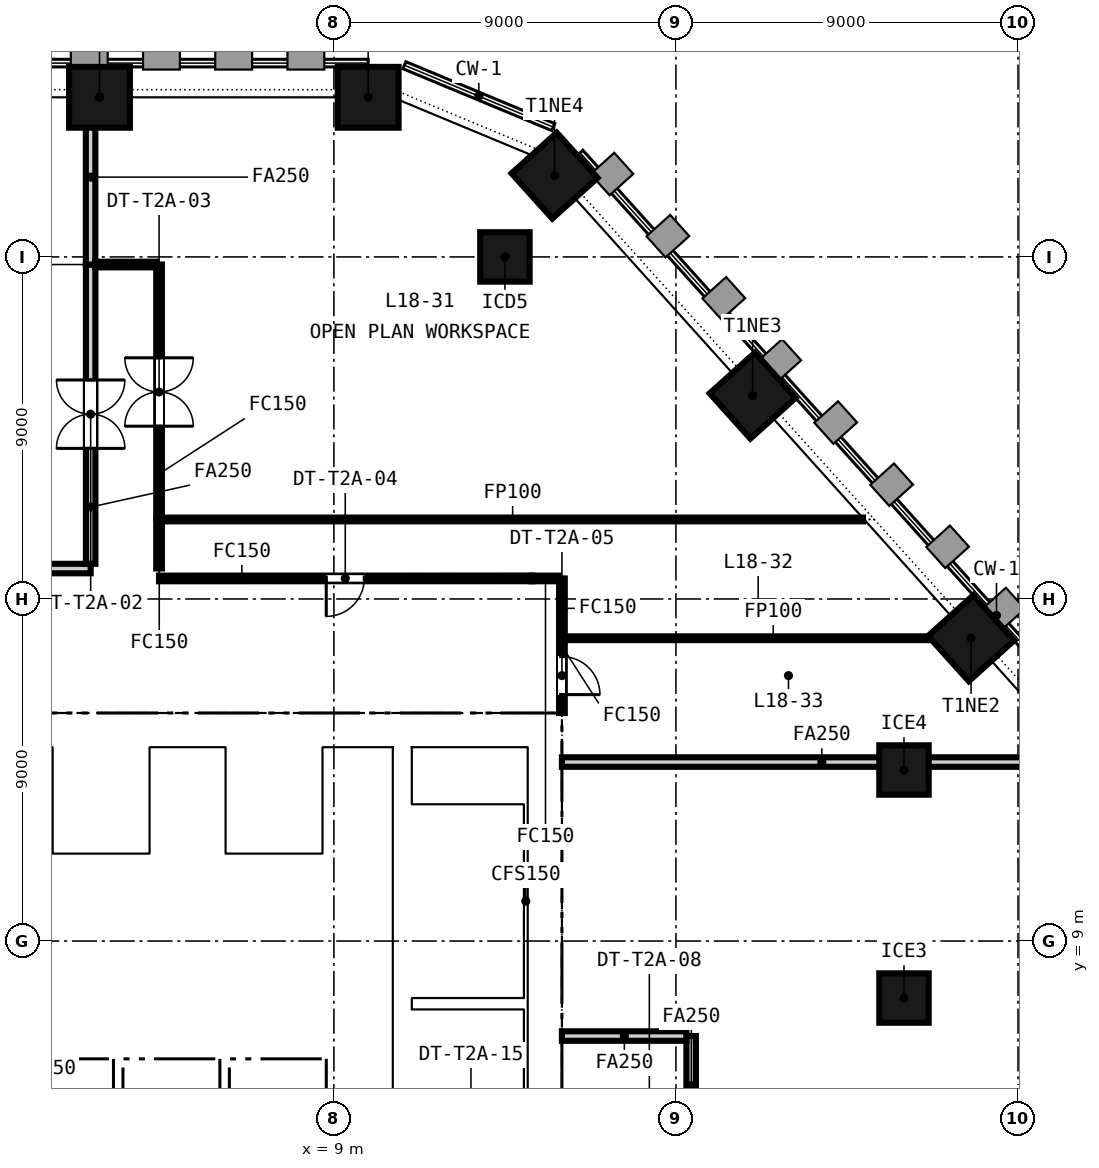
"""IFC4 building model, lengths in metres.
Left out: names, types, materials, properties, quantities, classifications, styles, units other than length and angle.
Written with IfcOpenShell. Run it as: python <this file> out.ifc"""

import sys

from ifc_helpers import new_model, si_unit, direction, frame, frame_2d, origin, origin_2d, place, context, subcontext, project, spatial, rectangle, extrude, element, fill, save


model = new_model("IFC4")
c1 = context("Model", 3, precision=1e-05, world=origin(), true_north=direction((0.0, 1.0)))
c2 = subcontext(c1, "Body", "Model", "MODEL_VIEW")
j1 = project(units=[si_unit("LENGTHUNIT", "METRE"), si_unit("PLANEANGLEUNIT", "RADIAN")], contexts=[c1])
p1 = place(None, origin())
s1 = spatial("IfcSite", under=j1, at=p1, CompositionType="ELEMENT")
p2 = place(p1, origin())
s2 = spatial("IfcBuilding", under=s1, at=p2, CompositionType="ELEMENT")
p3 = place(p2, frame((0.0, 0.0, 80.65)))
s3 = spatial("IfcBuildingStorey", under=s2, at=p3, CompositionType="ELEMENT", Elevation=80.65)
p4 = place(p3, frame((-15.0, 14.55, -0.15), z_axis=(0.0, 0.0, 1.0), x_axis=(1.0, 0.0, 0.0)))
e1 = element("IfcWall", 1, at=p4, inside=s3, PredefinedType="SOLIDWALL", context=c2, shape_type="SweptSolid", body=[
    extrude(rectangle(XDim=30.0, YDim=0.9, at=frame_2d((15.0, 0.0))), origin(), (0.0, 0.0, 1.0), 3.65),
])
p5 = place(p4, frame((9.25, 0.0, 0.15)))
e2 = element("IfcOpeningElement", 2, at=p5, cuts=e1, PredefinedType="OPENING", context=c2, shape_type="SweptSolid", body=[
    extrude(rectangle(XDim=1.5, YDim=2.1, at=frame_2d((0.75, 1.05))), frame((0.0, 0.46, 0.0), z_axis=(0.0, -1.0, 0.0), x_axis=(1.0, 0.0, 0.0)), (0.0, 0.0, 1.0), 0.92),
])
p6 = place(p4, frame((19.4, 0.0, 0.15)))
e3 = element("IfcOpeningElement", 3, at=p6, cuts=e1, PredefinedType="OPENING", context=c2, shape_type="SweptSolid", body=[
    extrude(rectangle(XDim=1.5, YDim=2.1, at=frame_2d((0.75, 1.05))), frame((0.0, 0.46, 0.0), z_axis=(0.0, -1.0, 0.0), x_axis=(1.0, 0.0, 0.0)), (0.0, 0.0, 1.0), 0.92),
])
p7 = place(p4, frame((1.5, 0.0, 0.15)))
e4 = element("IfcOpeningElement", 4, at=p7, cuts=e1, PredefinedType="OPENING", context=c2, shape_type="SweptSolid", body=[
    extrude(rectangle(XDim=1.2, YDim=2.1, at=frame_2d((0.6, 1.05))), frame((0.0, 0.46, 0.0), z_axis=(0.0, -1.0, 0.0), x_axis=(1.0, 0.0, 0.0)), (0.0, 0.0, 1.0), 0.92),
])
p8 = place(p4, frame((27.3, 0.0, 0.15)))
e5 = element("IfcOpeningElement", 5, at=p8, cuts=e1, PredefinedType="OPENING", context=c2, shape_type="SweptSolid", body=[
    extrude(rectangle(XDim=1.2, YDim=2.1, at=frame_2d((0.6, 1.05))), frame((0.0, 0.46, 0.0), z_axis=(0.0, -1.0, 0.0), x_axis=(1.0, 0.0, 0.0)), (0.0, 0.0, 1.0), 0.92),
])
p9 = place(p3, frame((14.55, 0.9, -0.15), z_axis=(0.0, 0.0, 1.0), x_axis=(0.0, 1.0, 0.0)))
e6 = element("IfcWall", 6, at=p9, inside=s3, PredefinedType="SOLIDWALL", context=c2, shape_type="SweptSolid", body=[
    extrude(rectangle(XDim=13.2, YDim=0.9, at=frame_2d((6.6, 0.0))), origin(), (0.0, 0.0, 1.0), 3.65),
])
p10 = place(p3, frame((10.8, 0.9, -0.15), z_axis=(0.0, 0.0, 1.0), x_axis=(0.0, 1.0, 0.0)))
e7 = element("IfcWall", 7, at=p10, inside=s3, PredefinedType="SOLIDWALL", context=c2, shape_type="SweptSolid", body=[
    extrude(rectangle(XDim=13.2, YDim=0.5, at=frame_2d((6.6, 0.0))), origin(), (0.0, 0.0, 1.0), 3.65),
])
for number, where, z_axis, x_axis in (
    (8, (9.902, 31.2, -0.15), (0.0, 0.0, 1.0), (-1.0, 0.0, 0.0)),
    (9, (2.832, 31.2, -0.15), (0.0, 0.0, 1.0), (-1.0, 0.0, 0.0)),
    (10, (25.765, 16.967, -0.15), (0.0, 0.0, 1.0), (-0.669, 0.743, 0.0)),
    (11, (20.018, 23.35, -0.15), (0.0, 0.0, 1.0), (-0.669, 0.743, 0.0)),
    (12, (14.806, 29.139, -0.15), (0.0, 0.0, 1.0), (-0.669, 0.743, 0.0)),
):
    element("IfcColumn", number, at=place(p3, frame(where, z_axis=z_axis, x_axis=x_axis)), inside=s3, PredefinedType="COLUMN", context=c2, shape_type="SweptSolid", body=[
        extrude(rectangle(XDim=1.6, YDim=1.6, at=origin_2d()), origin(), (0.0, 0.0, 1.0), 3.65),
    ])
for number, where, z_axis, x_axis in (
    (13, (13.5, 27.0, -0.15), (0.0, 0.0, 1.0), (1.0, 0.0, 0.0)),
    (14, (24.0, 7.5, -0.15), (0.0, 0.0, 1.0), (1.0, 0.0, 0.0)),
    (15, (24.0, 13.5, -0.15), (0.0, 0.0, 1.0), (1.0, 0.0, 0.0)),
):
    element("IfcColumn", number, at=place(p3, frame(where, z_axis=z_axis, x_axis=x_axis)), inside=s3, PredefinedType="COLUMN", context=c2, shape_type="SweptSolid", body=[
        extrude(rectangle(XDim=1.3, YDim=1.3, at=origin_2d()), origin(), (0.0, 0.0, 1.0), 3.65),
    ])
p11 = place(p3, frame((-10.55, 6.025, 0.0), z_axis=(0.0, 0.0, 1.0), x_axis=(1.0, 0.0, 0.0)))
e16 = element("IfcWall", 16, at=p11, inside=s3, PredefinedType="PARTITIONING", context=c2, shape_type="SweptSolid", body=[
    extrude(rectangle(XDim=21.1, YDim=0.25, at=frame_2d((10.55, 0.0))), origin(), (0.0, 0.0, 1.0), 3.5),
])
p12 = place(p3, frame((-4.125, 8.55, 0.0), z_axis=(0.0, 0.0, 1.0), x_axis=(1.0, 0.0, 0.0)))
e17 = element("IfcWall", 17, at=p12, inside=s3, PredefinedType="PARTITIONING", context=c2, shape_type="SweptSolid", body=[
    extrude(rectangle(XDim=14.675, YDim=0.2, at=frame_2d((7.337, 0.0))), origin(), (0.0, 0.0, 1.0), 3.5),
])
p13 = place(p12, frame((1.413, 0.0, 0.0)))
e18 = element("IfcOpeningElement", 18, at=p13, cuts=e17, PredefinedType="OPENING", context=c2, shape_type="SweptSolid", body=[
    extrude(rectangle(XDim=1.0, YDim=2.1, at=frame_2d((0.5, 1.05))), frame((0.0, 0.11, 0.0), z_axis=(0.0, -1.0, 0.0), x_axis=(1.0, 0.0, 0.0)), (0.0, 0.0, 1.0), 0.22),
])
p14 = place(p12, frame((5.0, 0.0, 0.0)))
e19 = element("IfcOpeningElement", 19, at=p14, cuts=e17, PredefinedType="OPENING", context=c2, shape_type="SweptSolid", body=[
    extrude(rectangle(XDim=1.0, YDim=2.1, at=frame_2d((0.5, 1.05))), frame((0.0, 0.11, 0.0), z_axis=(0.0, -1.0, 0.0), x_axis=(1.0, 0.0, 0.0)), (0.0, 0.0, 1.0), 0.22),
])
p15 = place(p12, frame((9.613, 0.0, 0.0)))
e20 = element("IfcOpeningElement", 20, at=p15, cuts=e17, PredefinedType="OPENING", context=c2, shape_type="SweptSolid", body=[
    extrude(rectangle(XDim=1.0, YDim=2.1, at=frame_2d((0.5, 1.05))), frame((0.0, 0.11, 0.0), z_axis=(0.0, -1.0, 0.0), x_axis=(1.0, 0.0, 0.0)), (0.0, 0.0, 1.0), 0.22),
])
p16 = place(p12, frame((13.475, 0.0, 0.0)))
e21 = element("IfcOpeningElement", 21, at=p16, cuts=e17, PredefinedType="OPENING", context=c2, shape_type="SweptSolid", body=[
    extrude(rectangle(XDim=0.9, YDim=2.1, at=frame_2d((0.45, 1.05))), frame((0.0, 0.11, 0.0), z_axis=(0.0, -1.0, 0.0), x_axis=(1.0, 0.0, 0.0)), (0.0, 0.0, 1.0), 0.22),
])
p17 = place(p3, frame((-4.25, 11.2, 0.0), z_axis=(0.0, 0.0, 1.0), x_axis=(1.0, 0.0, 0.0)))
e22 = element("IfcWall", 22, at=p17, inside=s3, PredefinedType="PARTITIONING", context=c2, shape_type="SweptSolid", body=[
    extrude(rectangle(XDim=8.65, YDim=0.2, at=frame_2d((4.325, 0.0))), origin(), (0.0, 0.0, 1.0), 3.5),
])
p18 = place(p17, frame((0.825, 0.0, 0.0)))
e23 = element("IfcOpeningElement", 23, at=p18, cuts=e22, PredefinedType="OPENING", context=c2, shape_type="SweptSolid", body=[
    extrude(rectangle(XDim=1.4, YDim=2.1, at=frame_2d((0.7, 1.05))), frame((0.0, 0.11, 0.0), z_axis=(0.0, -1.0, 0.0), x_axis=(1.0, 0.0, 0.0)), (0.0, 0.0, 1.0), 0.22),
])
p19 = place(p17, frame((3.625, 0.0, 0.0)))
e24 = element("IfcOpeningElement", 24, at=p19, cuts=e22, PredefinedType="OPENING", context=c2, shape_type="SweptSolid", body=[
    extrude(rectangle(XDim=1.4, YDim=2.1, at=frame_2d((0.7, 1.05))), frame((0.0, 0.11, 0.0), z_axis=(0.0, -1.0, 0.0), x_axis=(1.0, 0.0, 0.0)), (0.0, 0.0, 1.0), 0.22),
])
p20 = place(p3, frame((5.9, 11.2, 0.0), z_axis=(0.0, 0.0, 1.0), x_axis=(1.0, 0.0, 0.0)))
e25 = element("IfcWall", 25, at=p20, inside=s3, PredefinedType="PARTITIONING", context=c2, shape_type="SweptSolid", body=[
    extrude(rectangle(XDim=4.65, YDim=0.2, at=frame_2d((2.325, 0.0))), origin(), (0.0, 0.0, 1.0), 3.5),
])
p21 = place(p20, frame((3.4, 0.0, 0.0)))
e26 = element("IfcOpeningElement", 26, at=p21, cuts=e25, PredefinedType="OPENING", context=c2, shape_type="SweptSolid", body=[
    extrude(rectangle(XDim=0.9, YDim=2.1, at=frame_2d((0.45, 1.05))), frame((0.0, 0.11, 0.0), z_axis=(0.0, -1.0, 0.0), x_axis=(1.0, 0.0, 0.0)), (0.0, 0.0, 1.0), 0.22),
])
for number, where, z_axis, x_axis in (
    (27, (3.325, 3.6, 0.0), (0.0, 0.0, 1.0), (0.0, 1.0, 0.0)),
    (28, (6.125, 3.6, 0.0), (0.0, 0.0, 1.0), (0.0, 1.0, 0.0)),
    (29, (8.925, 3.6, 0.0), (0.0, 0.0, 1.0), (0.0, 1.0, 0.0)),
):
    element("IfcWall", number, at=place(p3, frame(where, z_axis=z_axis, x_axis=x_axis)), inside=s3, PredefinedType="PARTITIONING", context=c2, shape_type="SweptSolid", body=[
        extrude(rectangle(XDim=2.3, YDim=0.25, at=frame_2d((1.15, 0.0))), origin(), (0.0, 0.0, 1.0), 3.5),
    ])
p22 = place(p3, frame((3.1, 6.15, 0.0), z_axis=(0.0, 0.0, 1.0), x_axis=(0.0, 1.0, 0.0)))
e30 = element("IfcWall", 30, at=p22, inside=s3, PredefinedType="PARTITIONING", context=c2, shape_type="SweptSolid", body=[
    extrude(rectangle(XDim=2.3, YDim=0.15, at=frame_2d((1.15, 0.0))), origin(), (0.0, 0.0, 1.0), 3.5),
])
p23 = place(p3, frame((8.925, 6.15, 0.0), z_axis=(0.0, 0.0, 1.0), x_axis=(0.0, 1.0, 0.0)))
e31 = element("IfcWall", 31, at=p23, inside=s3, PredefinedType="PARTITIONING", context=c2, shape_type="SweptSolid", body=[
    extrude(rectangle(XDim=2.3, YDim=0.25, at=frame_2d((1.15, 0.0))), origin(), (0.0, 0.0, 1.0), 3.5),
])
for number, where, z_axis, x_axis in (
    (32, (1.475, 11.3, 0.0), (0.0, 0.0, 1.0), (0.0, 1.0, 0.0)),
    (33, (4.275, 11.3, 0.0), (0.0, 0.0, 1.0), (0.0, 1.0, 0.0)),
    (34, (6.025, 11.3, 0.0), (0.0, 0.0, 1.0), (0.0, 1.0, 0.0)),
    (35, (8.825, 11.3, 0.0), (0.0, 0.0, 1.0), (0.0, 1.0, 0.0)),
):
    element("IfcWall", number, at=place(p3, frame(where, z_axis=z_axis, x_axis=x_axis)), inside=s3, PredefinedType="PARTITIONING", context=c2, shape_type="SweptSolid", body=[
        extrude(rectangle(XDim=2.8, YDim=0.25, at=frame_2d((1.4, 0.0))), origin(), (0.0, 0.0, 1.0), 3.5),
    ])
p24 = place(p3, frame((11.05, 7.35, 0.0), z_axis=(0.0, 0.0, 1.0), x_axis=(1.0, 0.0, 0.0)))
e36 = element("IfcWall", 36, at=p24, inside=s3, PredefinedType="SOLIDWALL", context=c2, shape_type="SweptSolid", body=[
    extrude(rectangle(XDim=2.95, YDim=0.3, at=frame_2d((1.475, 0.0))), origin(), (0.0, 0.0, 1.0), 3.5),
])
p25 = place(p3, frame((14.05, 0.9, 0.0), z_axis=(0.0, 0.0, 1.0), x_axis=(0.0, 1.0, 0.0)))
e37 = element("IfcWall", 37, at=p25, inside=s3, PredefinedType="SOLIDWALL", context=c2, shape_type="SweptSolid", body=[
    extrude(rectangle(XDim=13.2, YDim=0.1, at=frame_2d((6.6, 0.0))), origin(), (0.0, 0.0, 1.0), 3.5),
])
p26 = place(p3, frame((4.4, 26.8, 0.0), z_axis=(0.0, 0.0, 1.0), x_axis=(0.0, -1.0, 0.0)))
e38 = element("IfcWall", 38, at=p26, inside=s3, PredefinedType="PARTITIONING", context=c2, shape_type="SweptSolid", body=[
    extrude(rectangle(XDim=6.708, YDim=0.15, at=frame_2d((3.354, 0.0))), origin(), (0.0, 0.0, 1.0), 2.741),
])
p27 = place(p26, frame((2.454, 0.0, 0.0)))
e39 = element("IfcOpeningElement", 39, at=p27, cuts=e38, PredefinedType="OPENING", context=c2, shape_type="SweptSolid", body=[
    extrude(rectangle(XDim=1.8, YDim=2.1, at=frame_2d((0.9, 1.05))), frame((0.0, 0.085, 0.0), z_axis=(0.0, -1.0, 0.0), x_axis=(1.0, 0.0, 0.0)), (0.0, 0.0, 1.0), 0.17),
])
p28 = place(p3, frame((4.4, 20.092, 0.0), z_axis=(0.0, 0.0, 1.0), x_axis=(0.0, -1.0, 0.0)))
e40 = element("IfcWall", 40, at=p28, inside=s3, PredefinedType="PARTITIONING", context=c2, shape_type="SweptSolid", body=[
    extrude(rectangle(XDim=1.29, YDim=0.15, at=frame_2d((0.645, 0.0))), origin(), (0.0, 0.0, 1.0), 2.741),
])
p29 = place(p3, frame((15.0, 18.54, 0.0), z_axis=(0.0, 0.0, 1.0), x_axis=(0.0, -1.0, 0.0)))
e41 = element("IfcWall", 41, at=p29, inside=s3, PredefinedType="PARTITIONING", context=c2, shape_type="SweptSolid", body=[
    extrude(rectangle(XDim=1.573, YDim=0.15, at=frame_2d((0.787, 0.0))), origin(), (0.0, 0.0, 1.0), 2.741),
])
p30 = place(p3, frame((15.0, 16.967, 0.0), z_axis=(0.0, 0.0, 1.0), x_axis=(0.0, -1.0, 0.0)))
e42 = element("IfcWall", 42, at=p30, inside=s3, PredefinedType="PARTITIONING", context=c2, shape_type="SweptSolid", body=[
    extrude(rectangle(XDim=1.967, YDim=0.15, at=frame_2d((0.983, 0.0))), origin(), (0.0, 0.0, 1.0), 2.741),
])
p31 = place(p30, frame((0.483, 0.0, 0.0)))
e43 = element("IfcOpeningElement", 43, at=p31, cuts=e42, PredefinedType="OPENING", context=c2, shape_type="SweptSolid", body=[
    extrude(rectangle(XDim=1.0, YDim=2.1, at=frame_2d((0.5, 1.05))), frame((0.0, 0.085, 0.0), z_axis=(0.0, -1.0, 0.0), x_axis=(1.0, 0.0, 0.0)), (0.0, 0.0, 1.0), 0.17),
])
p32 = place(p3, frame((18.4, 6.5, 0.0), z_axis=(0.0, 0.0, 1.0), x_axis=(0.0, -1.0, 0.0)))
e44 = element("IfcWall", 44, at=p32, inside=s3, PredefinedType="PARTITIONING", context=c2, shape_type="SweptSolid", body=[
    extrude(rectangle(XDim=2.6, YDim=0.25, at=frame_2d((1.3, 0.0))), origin(), (0.0, 0.0, 1.0), 2.741),
])
p33 = place(p3, frame((-18.275, 18.8, 0.0), z_axis=(0.0, 0.0, 1.0), x_axis=(1.0, 0.0, 0.0)))
e45 = element("IfcWall", 45, at=p33, inside=s3, PredefinedType="PARTITIONING", context=c2, shape_type="SweptSolid", body=[
    extrude(rectangle(XDim=20.875, YDim=0.25, at=frame_2d((10.438, 0.0))), origin(), (0.0, 0.0, 1.0), 2.741),
])
p34 = place(p33, frame((9.538, 0.0, 0.0)))
e46 = element("IfcOpeningElement", 46, at=p34, cuts=e45, PredefinedType="OPENING", context=c2, shape_type="SweptSolid", body=[
    extrude(rectangle(XDim=1.8, YDim=2.1, at=frame_2d((0.9, 1.05))), frame((0.0, 0.135, 0.0), z_axis=(0.0, -1.0, 0.0), x_axis=(1.0, 0.0, 0.0)), (0.0, 0.0, 1.0), 0.27),
])
p35 = place(p3, frame((2.6, 18.925, 0.0), z_axis=(0.0, 0.0, 1.0), x_axis=(0.0, 1.0, 0.0)))
e47 = element("IfcWall", 47, at=p35, inside=s3, PredefinedType="PARTITIONING", context=c2, shape_type="SweptSolid", body=[
    extrude(rectangle(XDim=7.875, YDim=0.25, at=frame_2d((3.938, 0.0))), origin(), (0.0, 0.0, 1.0), 2.741),
])
p36 = place(p35, frame((3.038, 0.0, 0.0)))
e48 = element("IfcOpeningElement", 48, at=p36, cuts=e47, PredefinedType="OPENING", context=c2, shape_type="SweptSolid", body=[
    extrude(rectangle(XDim=1.8, YDim=2.1, at=frame_2d((0.9, 1.05))), frame((0.0, 0.135, 0.0), z_axis=(0.0, -1.0, 0.0), x_axis=(1.0, 0.0, 0.0)), (0.0, 0.0, 1.0), 0.27),
])
p37 = place(p3, frame((2.598, 26.8, 0.0), z_axis=(0.0, 0.0, 1.0), x_axis=(0.0, 1.0, 0.0)))
e49 = element("IfcWall", 49, at=p37, inside=s3, PredefinedType="PARTITIONING", context=c2, shape_type="SweptSolid", body=[
    extrude(rectangle(XDim=4.6, YDim=0.25, at=frame_2d((2.3, 0.0))), origin(), (0.0, 0.0, 1.0), 2.741),
])
p38 = place(p3, frame((2.725, 26.8, 0.0), z_axis=(0.0, 0.0, 1.0), x_axis=(1.0, 0.0, 0.0)))
e50 = element("IfcWall", 50, at=p38, inside=s3, PredefinedType="PARTITIONING", context=c2, shape_type="SweptSolid", body=[
    extrude(rectangle(XDim=1.6, YDim=0.15, at=frame_2d((0.8, 0.0))), origin(), (0.0, 0.0, 1.0), 2.741),
])
p39 = place(p3, frame((4.475, 20.092, 0.0), z_axis=(0.0, 0.0, 1.0), x_axis=(1.0, 0.0, 0.0)))
e51 = element("IfcWall", 51, at=p39, inside=s3, PredefinedType="PARTITIONING", context=c2, shape_type="SweptSolid", body=[
    extrude(rectangle(XDim=18.446, YDim=0.1, at=frame_2d((9.223, 0.0))), origin(), (0.0, 0.0, 1.0), 2.741),
])
p40 = place(p3, frame((14.2, 18.542, 0.0), z_axis=(0.0, 0.0, 1.0), x_axis=(-0.999999980148, -0.000199257761, 0.0)))
e52 = element("IfcWall", 52, at=p40, inside=s3, PredefinedType="PARTITIONING", context=c2, shape_type="SweptSolid", body=[
    extrude(rectangle(XDim=9.802, YDim=0.15, at=frame_2d((4.901, 0.0))), origin(), (0.0, 0.0, 1.0), 2.741),
])
p41 = place(p40, frame((4.401, 0.0, 0.0)))
e53 = element("IfcOpeningElement", 53, at=p41, cuts=e52, PredefinedType="OPENING", context=c2, shape_type="SweptSolid", body=[
    extrude(rectangle(XDim=1.0, YDim=2.1, at=frame_2d((0.5, 1.05))), frame((0.0, 0.085, 0.0), z_axis=(0.0, -1.0, 0.0), x_axis=(1.0, 0.0, 0.0)), (0.0, 0.0, 1.0), 0.17),
])
p42 = place(p3, frame((14.2, 18.54, 0.0), z_axis=(0.0, 0.0, 1.0), x_axis=(1.0, 0.0, 0.0)))
e54 = element("IfcWall", 54, at=p42, inside=s3, PredefinedType="PARTITIONING", context=c2, shape_type="SweptSolid", body=[
    extrude(rectangle(XDim=0.725, YDim=0.15, at=frame_2d((0.363, 0.0))), origin(), (0.0, 0.0, 1.0), 2.741),
])
p43 = place(p3, frame((15.075, 16.967, 0.0), z_axis=(0.0, 0.0, 1.0), x_axis=(1.0, 0.0, 0.0)))
e55 = element("IfcWall", 55, at=p43, inside=s3, PredefinedType="PARTITIONING", context=c2, shape_type="SweptSolid", body=[
    extrude(rectangle(XDim=10.96, YDim=0.1, at=frame_2d((5.48, 0.0))), origin(), (0.0, 0.0, 1.0), 2.741),
])
p44 = place(p3, frame((15.0, 13.709, 0.0), z_axis=(0.0, 0.0, 1.0), x_axis=(1.0, 0.0, 0.0)))
e56 = element("IfcWall", 56, at=p44, inside=s3, PredefinedType="PARTITIONING", context=c2, shape_type="SweptSolid", body=[
    extrude(rectangle(XDim=13.668, YDim=0.25, at=frame_2d((6.834, 0.0))), origin(), (0.0, 0.0, 1.0), 2.741),
])
p45 = place(p3, frame((15.0, 6.5, 0.0), z_axis=(0.0, 0.0, 1.0), x_axis=(1.0, 0.0, 0.0)))
e57 = element("IfcWall", 57, at=p45, inside=s3, PredefinedType="PARTITIONING", context=c2, shape_type="SweptSolid", body=[
    extrude(rectangle(XDim=3.275, YDim=0.25, at=frame_2d((1.637, 0.0))), origin(), (0.0, 0.0, 1.0), 2.741),
])
p46 = place(p14, origin())
e58 = element("IfcDoor", 58, at=p46, inside=s3, OperationType="SINGLE_SWING_RIGHT", PredefinedType="DOOR", context=c2, shape_type="SweptSolid", body=[
    extrude(rectangle(XDim=1.0, YDim=2.1, at=frame_2d((0.5, 1.05))), frame((0.0, 0.025, 0.0), z_axis=(0.0, -1.0, 0.0), x_axis=(1.0, 0.0, 0.0)), (0.0, 0.0, 1.0), 0.05),
])
fill(e19, e58)
p47 = place(p15, origin())
e59 = element("IfcDoor", 59, at=p47, inside=s3, OperationType="SINGLE_SWING_LEFT", PredefinedType="DOOR", context=c2, shape_type="SweptSolid", body=[
    extrude(rectangle(XDim=1.0, YDim=2.1, at=frame_2d((0.5, 1.05))), frame((0.0, 0.025, 0.0), z_axis=(0.0, -1.0, 0.0), x_axis=(1.0, 0.0, 0.0)), (0.0, 0.0, 1.0), 0.05),
])
fill(e20, e59)
p48 = place(p16, origin())
e60 = element("IfcDoor", 60, at=p48, inside=s3, OperationType="SINGLE_SWING_RIGHT", PredefinedType="DOOR", context=c2, shape_type="SweptSolid", body=[
    extrude(rectangle(XDim=0.9, YDim=2.1, at=frame_2d((0.45, 1.05))), frame((0.0, 0.025, 0.0), z_axis=(0.0, -1.0, 0.0), x_axis=(1.0, 0.0, 0.0)), (0.0, 0.0, 1.0), 0.05),
])
fill(e21, e60)
p49 = place(p21, origin())
e61 = element("IfcDoor", 61, at=p49, inside=s3, OperationType="SINGLE_SWING_LEFT", PredefinedType="DOOR", context=c2, shape_type="SweptSolid", body=[
    extrude(rectangle(XDim=0.9, YDim=2.1, at=frame_2d((0.45, 1.05))), frame((0.0, 0.025, 0.0), z_axis=(0.0, -1.0, 0.0), x_axis=(1.0, 0.0, 0.0)), (0.0, 0.0, 1.0), 0.05),
])
fill(e26, e61)
p50 = place(p6, origin())
e62 = element("IfcDoor", 62, at=p50, inside=s3, OperationType="DOUBLE_DOOR_SINGLE_SWING", PredefinedType="DOOR", context=c2, shape_type="SweptSolid", body=[
    extrude(rectangle(XDim=1.5, YDim=2.1, at=frame_2d((0.75, 1.05))), frame((0.0, 0.025, 0.0), z_axis=(0.0, -1.0, 0.0), x_axis=(1.0, 0.0, 0.0)), (0.0, 0.0, 1.0), 0.05),
])
fill(e3, e62)
p51 = place(p8, origin())
e63 = element("IfcDoor", 63, at=p51, inside=s3, OperationType="SINGLE_SWING_LEFT", PredefinedType="DOOR", context=c2, shape_type="SweptSolid", body=[
    extrude(rectangle(XDim=1.2, YDim=2.1, at=frame_2d((0.6, 1.05))), frame((0.0, 0.025, 0.0), z_axis=(0.0, -1.0, 0.0), x_axis=(1.0, 0.0, 0.0)), (0.0, 0.0, 1.0), 0.05),
])
fill(e5, e63)
p52 = place(p36, origin())
e64 = element("IfcDoor", 64, at=p52, inside=s3, OperationType="DOUBLE_DOOR_DOUBLE_SWING", PredefinedType="DOOR", context=c2, shape_type="SweptSolid", body=[
    extrude(rectangle(XDim=1.8, YDim=2.1, at=frame_2d((0.9, 1.05))), frame((0.0, 0.025, 0.0), z_axis=(0.0, -1.0, 0.0), x_axis=(1.0, 0.0, 0.0)), (0.0, 0.0, 1.0), 0.05),
])
fill(e48, e64)
p53 = place(p27, origin())
e65 = element("IfcDoor", 65, at=p53, inside=s3, OperationType="DOUBLE_DOOR_DOUBLE_SWING", PredefinedType="DOOR", context=c2, shape_type="SweptSolid", body=[
    extrude(rectangle(XDim=1.8, YDim=2.1, at=frame_2d((0.9, 1.05))), frame((0.0, 0.025, 0.0), z_axis=(0.0, -1.0, 0.0), x_axis=(1.0, 0.0, 0.0)), (0.0, 0.0, 1.0), 0.05),
])
fill(e39, e65)
p54 = place(p41, origin())
e66 = element("IfcDoor", 66, at=p54, inside=s3, OperationType="SINGLE_SWING_RIGHT", PredefinedType="DOOR", context=c2, shape_type="SweptSolid", body=[
    extrude(rectangle(XDim=1.0, YDim=2.1, at=frame_2d((0.5, 1.05))), frame((0.0, 0.025, 0.0), z_axis=(0.0, -1.0, 0.0), x_axis=(1.0, 0.0, 0.0)), (0.0, 0.0, 1.0), 0.05),
])
fill(e53, e66)
p55 = place(p31, origin())
e67 = element("IfcDoor", 67, at=p55, inside=s3, OperationType="SINGLE_SWING_RIGHT", PredefinedType="DOOR", context=c2, shape_type="SweptSolid", body=[
    extrude(rectangle(XDim=1.0, YDim=2.1, at=frame_2d((0.5, 1.05))), frame((0.0, 0.025, 0.0), z_axis=(0.0, -1.0, 0.0), x_axis=(1.0, 0.0, 0.0)), (0.0, 0.0, 1.0), 0.05),
])
fill(e43, e67)
save(model, sys.argv[1])
